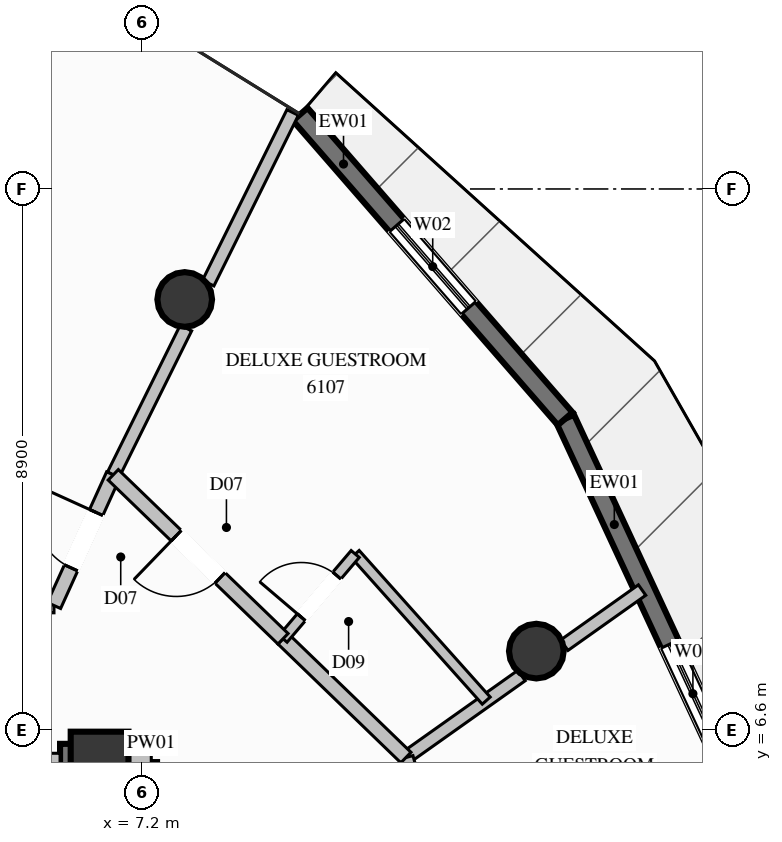
"""IFC4 building model, lengths in metres.
Left out: names, types, materials, properties, quantities, classifications, styles, units other than length and angle.
Written with IfcOpenShell. Run it as: python <this file> out.ifc"""

import sys

from ifc_helpers import new_model, si_unit, direction, frame, frame_2d, origin, origin_2d, place, context, subcontext, project, spatial, rectangle, circle, extrude, element, fill, save


model = new_model("IFC4")
c1 = context("Model", 3, precision=1e-05, world=origin(), true_north=direction((0.0, 1.0)))
c2 = subcontext(c1, "Body", "Model", "MODEL_VIEW")
j1 = project(units=[si_unit("LENGTHUNIT", "METRE"), si_unit("PLANEANGLEUNIT", "RADIAN")], contexts=[c1])
p1 = place(None, origin())
s1 = spatial("IfcSite", under=j1, at=p1, CompositionType="ELEMENT")
p2 = place(p1, origin())
s2 = spatial("IfcBuilding", under=s1, at=p2, CompositionType="ELEMENT")
p3 = place(p2, frame((0.0, 0.0, 227.2)))
s3 = spatial("IfcBuildingStorey", under=s2, at=p3, CompositionType="ELEMENT", Elevation=227.2)
p4 = place(p3, frame((6.5, 6.1, 0.0), z_axis=(0.0, 0.0, 1.0), x_axis=(1.0, 0.0, 0.0)))
e1 = element("IfcColumn", 1, at=p4, inside=s3, PredefinedType="COLUMN", context=c2, shape_type="SweptSolid", body=[
    extrude(rectangle(XDim=0.95, YDim=0.95, at=origin_2d()), origin(), (0.0, 0.0, 1.0), 3.6),
])
p5 = place(p3, frame((5.85, 6.1, 0.0), z_axis=(0.0, 0.0, 1.0), x_axis=(1.0, 0.0, 0.0)))
e2 = element("IfcWall", 2, at=p5, inside=s3, PredefinedType="SHEAR", context=c2, shape_type="SweptSolid", body=[
    extrude(rectangle(XDim=0.375, YDim=0.55, at=frame_2d((0.188, 0.0))), origin(), (0.0, 0.0, 1.0), 3.6),
])
p6 = place(p3, frame((6.5, 3.35, 0.0), z_axis=(0.0, 0.0, 1.0), x_axis=(0.0, 1.0, 0.0)))
e3 = element("IfcWall", 3, at=p6, inside=s3, PredefinedType="SHEAR", context=c2, shape_type="SweptSolid", body=[
    extrude(rectangle(XDim=3.025, YDim=0.55, at=frame_2d((1.512, 0.0))), origin(), (0.0, 0.0, 1.0), 3.6),
])
for number, where, z_axis, x_axis in (
    (4, (13.683, 7.9, 0.0), (0.0, 0.0, 1.0), (1.0, 0.0, 0.0)),
    (5, (7.9, 13.683, 0.0), (0.0, 0.0, 1.0), (1.0, 0.0, 0.0)),
):
    element("IfcColumn", number, at=place(p3, frame(where, z_axis=z_axis, x_axis=x_axis)), inside=s3, PredefinedType="COLUMN", context=c2, shape_type="SweptSolid", body=[
        extrude(circle(Radius=0.45, at=origin_2d()), origin(), (0.0, 0.0, 1.0), 3.6),
    ])
p7 = place(p3, frame((14.157, 11.721, 0.0), z_axis=(0.0, 0.0, 1.0), x_axis=(0.421409426627, -0.906870495247, 0.0)))
e6 = element("IfcWall", 6, at=p7, inside=s3, PredefinedType="SOLIDWALL", context=c2, shape_type="SweptSolid", body=[
    extrude(rectangle(XDim=6.785, YDim=0.32, at=frame_2d((3.392, 0.0))), origin(), (0.0, 0.0, 1.0), 3.36),
])
p8 = place(p7, frame((4.086, 0.0, 0.35)))
e7 = element("IfcOpeningElement", 7, at=p8, cuts=e6, PredefinedType="OPENING", context=c2, shape_type="SweptSolid", body=[
    extrude(rectangle(XDim=1.8, YDim=2.6, at=frame_2d((0.9, 1.3))), frame((0.0, 0.17, 0.0), z_axis=(0.0, -1.0, 0.0), x_axis=(1.0, 0.0, 0.0)), (0.0, 0.0, 1.0), 0.34),
])
p9 = place(p3, frame((9.8, 16.728, 0.0), z_axis=(0.0, 0.0, 1.0), x_axis=(0.656431844165, -0.754385335201, 0.0)))
e8 = element("IfcWall", 8, at=p9, inside=s3, PredefinedType="SOLIDWALL", context=c2, shape_type="SweptSolid", body=[
    extrude(rectangle(XDim=6.637, YDim=0.32, at=frame_2d((3.319, 0.0))), origin(), (0.0, 0.0, 1.0), 3.36),
])
p10 = place(p9, frame((2.419, 0.0, 0.35)))
e9 = element("IfcOpeningElement", 9, at=p10, cuts=e8, PredefinedType="OPENING", context=c2, shape_type="SweptSolid", body=[
    extrude(rectangle(XDim=1.8, YDim=2.6, at=frame_2d((0.9, 1.3))), frame((0.0, 0.17, 0.0), z_axis=(0.0, -1.0, 0.0), x_axis=(1.0, 0.0, 0.0)), (0.0, 0.0, 1.0), 0.34),
])
p11 = place(p3, frame((-7.35, 8.65, 0.0), z_axis=(0.0, 0.0, 1.0), x_axis=(1.0, 0.0, 0.0)))
e10 = element("IfcWall", 10, at=p11, inside=s3, PredefinedType="PARTITIONING", context=c2, shape_type="SweptSolid", body=[
    extrude(rectangle(XDim=13.1, YDim=0.24, at=frame_2d((6.55, 0.0))), origin(), (0.0, 0.0, 1.0), 3.36),
])
p12 = place(p3, frame((3.0, 6.1, 0.0), z_axis=(0.0, 0.0, 1.0), x_axis=(1.0, 0.0, 0.0)))
e11 = element("IfcWall", 11, at=p12, inside=s3, PredefinedType="PARTITIONING", context=c2, shape_type="SweptSolid", body=[
    extrude(rectangle(XDim=2.85, YDim=0.24, at=frame_2d((1.425, 0.0))), origin(), (0.0, 0.0, 1.0), 2.445),
])
p13 = place(p3, frame((7.35, 5.3, 0.0), z_axis=(0.0, 0.0, 1.0), x_axis=(0.0, 1.0, 0.0)))
e12 = element("IfcWall", 12, at=p13, inside=s3, PredefinedType="PARTITIONING", context=c2, shape_type="SweptSolid", body=[
    extrude(rectangle(XDim=0.8, YDim=0.24, at=frame_2d((0.4, 0.0))), origin(), (0.0, 0.0, 1.0), 2.445),
])
p14 = place(p3, frame((6.5, 6.1, 0.0), z_axis=(0.0, 0.0, 1.0), x_axis=(1.0, 0.0, 0.0)))
e13 = element("IfcWall", 13, at=p14, inside=s3, PredefinedType="PARTITIONING", context=c2, shape_type="SweptSolid", body=[
    extrude(rectangle(XDim=0.85, YDim=0.24, at=frame_2d((0.425, 0.0))), origin(), (0.0, 0.0, 1.0), 2.876),
])
p15 = place(p3, frame((11.538, 6.15, 0.0), z_axis=(0.0, 0.0, 1.0), x_axis=(0.815682557634, 0.578499753822, 0.0)))
e14 = element("IfcWall", 14, at=p15, inside=s3, PredefinedType="PARTITIONING", context=c2, shape_type="SweptSolid", body=[
    extrude(rectangle(XDim=2.33, YDim=0.21, at=frame_2d((1.165, 0.0))), origin(), (0.0, 0.0, 1.0), 2.876),
])
p16 = place(p3, frame((14.143, 7.997, 0.0), z_axis=(0.0, 0.0, 1.0), x_axis=(0.815727547958, 0.5784363124, 0.0)))
e15 = element("IfcWall", 15, at=p16, inside=s3, PredefinedType="PARTITIONING", context=c2, shape_type="SweptSolid", body=[
    extrude(rectangle(XDim=1.568, YDim=0.21, at=frame_2d((0.784, 0.0))), origin(), (0.0, 0.0, 1.0), 3.36),
])
p17 = place(p3, frame((6.725, 10.799, 0.0), z_axis=(0.0, 0.0, 1.0), x_axis=(0.443620421332, 0.896214774358, 0.0)))
e16 = element("IfcWall", 16, at=p17, inside=s3, PredefinedType="PARTITIONING", context=c2, shape_type="SweptSolid", body=[
    extrude(rectangle(XDim=2.693, YDim=0.21, at=frame_2d((1.347, 0.0))), origin(), (0.0, 0.0, 1.0), 2.876),
])
p18 = place(p3, frame((8.286, 13.952, 0.0), z_axis=(0.0, 0.0, 1.0), x_axis=(0.443654587732, 0.896197861404, 0.0)))
e17 = element("IfcWall", 17, at=p18, inside=s3, PredefinedType="PARTITIONING", context=c2, shape_type="SweptSolid", body=[
    extrude(rectangle(XDim=3.131, YDim=0.21, at=frame_2d((1.565, 0.0))), origin(), (0.0, 0.0, 1.0), 3.36),
])
p19 = place(p3, frame((5.75, 8.65, 0.0), z_axis=(0.0, 0.0, 1.0), x_axis=(0.413171528251, 0.910653220629, 0.0)))
e18 = element("IfcWall", 18, at=p19, inside=s3, PredefinedType="PARTITIONING", context=c2, shape_type="SweptSolid", body=[
    extrude(rectangle(XDim=2.36, YDim=0.24, at=frame_2d((1.18, 0.0))), origin(), (0.0, 0.0, 1.0), 2.876),
])
p20 = place(p19, frame((0.68, 0.0, 0.0)))
e19 = element("IfcOpeningElement", 19, at=p20, cuts=e18, PredefinedType="OPENING", context=c2, shape_type="SweptSolid", body=[
    extrude(rectangle(XDim=1.0, YDim=2.2, at=frame_2d((0.5, 1.1))), frame((0.0, 0.13, 0.0), z_axis=(0.0, -1.0, 0.0), x_axis=(1.0, 0.0, 0.0)), (0.0, 0.0, 1.0), 0.26),
])
p21 = place(p3, frame((12.56, 2.467, 0.0), z_axis=(0.0, 0.0, 1.0), x_axis=(-0.267390175797, 0.963588342544, 0.0)))
e20 = element("IfcWall", 20, at=p21, inside=s3, PredefinedType="PARTITIONING", context=c2, shape_type="SweptSolid", body=[
    extrude(rectangle(XDim=3.822, YDim=0.24, at=frame_2d((1.911, 0.0))), origin(), (0.0, 0.0, 1.0), 3.36),
])
p22 = place(p21, frame((1.411, 0.0, 0.0)))
e21 = element("IfcOpeningElement", 21, at=p22, cuts=e20, PredefinedType="OPENING", context=c2, shape_type="SweptSolid", body=[
    extrude(rectangle(XDim=1.0, YDim=2.2, at=frame_2d((0.5, 1.1))), frame((0.0, 0.13, 0.0), z_axis=(0.0, -1.0, 0.0), x_axis=(1.0, 0.0, 0.0)), (0.0, 0.0, 1.0), 0.26),
])
p23 = place(p3, frame((11.538, 6.15, 0.0), z_axis=(0.0, 0.0, 1.0), x_axis=(-0.719078080202, 0.694929287463, 0.0)))
e22 = element("IfcWall", 22, at=p23, inside=s3, PredefinedType="PARTITIONING", context=c2, shape_type="SweptSolid", body=[
    extrude(rectangle(XDim=2.811, YDim=0.24, at=frame_2d((1.405, 0.0))), origin(), (0.0, 0.0, 1.0), 3.36),
])
p24 = place(p3, frame((12.859, 7.086, 0.0), z_axis=(0.0, 0.0, 1.0), x_axis=(-0.666357777504, 0.745632156201, 0.0)))
e23 = element("IfcWall", 23, at=p24, inside=s3, PredefinedType="PLUMBINGWALL", context=c2, shape_type="SweptSolid", body=[
    extrude(rectangle(XDim=3.234, YDim=0.175, at=frame_2d((1.617, 0.0))), origin(), (0.0, 0.0, 1.0), 3.36),
])
p25 = place(p3, frame((9.517, 8.103, 0.0), z_axis=(0.0, 0.0, 1.0), x_axis=(0.64830617709, 0.76137973492, 0.0)))
e24 = element("IfcWall", 24, at=p25, inside=s3, PredefinedType="PLUMBINGWALL", context=c2, shape_type="SweptSolid", body=[
    extrude(rectangle(XDim=1.831, YDim=0.175, at=frame_2d((0.916, 0.0))), origin(), (0.0, 0.0, 1.0), 3.36),
])
p26 = place(p25, frame((0.465, 0.0, 0.0)))
e25 = element("IfcOpeningElement", 25, at=p26, cuts=e24, PredefinedType="OPENING", context=c2, shape_type="SweptSolid", body=[
    extrude(rectangle(XDim=0.9, YDim=2.1, at=frame_2d((0.45, 1.05))), frame((0.0, 0.098, 0.0), z_axis=(0.0, -1.0, 0.0), x_axis=(1.0, 0.0, 0.0)), (0.0, 0.0, 1.0), 0.195),
])
p27 = place(p3, frame((9.517, 8.103, 0.0), z_axis=(0.0, 0.0, 1.0), x_axis=(-0.719359188441, 0.694638292931, 0.0)))
e26 = element("IfcWall", 26, at=p27, inside=s3, PredefinedType="PARTITIONING", context=c2, shape_type="SweptSolid", body=[
    extrude(rectangle(XDim=3.881, YDim=0.24, at=frame_2d((1.94, 0.0))), origin(), (0.0, 0.0, 1.0), 3.36),
])
p28 = place(p27, frame((1.441, 0.0, 0.0)))
e27 = element("IfcOpeningElement", 27, at=p28, cuts=e26, PredefinedType="OPENING", context=c2, shape_type="SweptSolid", body=[
    extrude(rectangle(XDim=1.0, YDim=2.2, at=frame_2d((0.5, 1.1))), frame((0.0, 0.13, 0.0), z_axis=(0.0, -1.0, 0.0), x_axis=(1.0, 0.0, 0.0)), (0.0, 0.0, 1.0), 0.26),
])
p29 = place(p8, origin())
e28 = element("IfcWindow", 28, at=p29, inside=s3, PartitioningType="SINGLE_PANEL", PredefinedType="WINDOW", context=c2, shape_type="SweptSolid", body=[
    extrude(rectangle(XDim=1.8, YDim=2.6, at=frame_2d((0.9, 1.3))), frame((0.0, 0.03, 0.0), z_axis=(0.0, -1.0, 0.0), x_axis=(1.0, 0.0, 0.0)), (0.0, 0.0, 1.0), 0.06),
])
fill(e7, e28)
p30 = place(p10, origin())
e29 = element("IfcWindow", 29, at=p30, inside=s3, PartitioningType="SINGLE_PANEL", PredefinedType="WINDOW", context=c2, shape_type="SweptSolid", body=[
    extrude(rectangle(XDim=1.8, YDim=2.6, at=frame_2d((0.9, 1.3))), frame((0.0, 0.03, 0.0), z_axis=(0.0, -1.0, 0.0), x_axis=(1.0, 0.0, 0.0)), (0.0, 0.0, 1.0), 0.06),
])
fill(e9, e29)
p31 = place(p20, origin())
e30 = element("IfcDoor", 30, at=p31, inside=s3, OperationType="SINGLE_SWING_RIGHT", PredefinedType="DOOR", context=c2, shape_type="SweptSolid", body=[
    extrude(rectangle(XDim=1.0, YDim=2.2, at=frame_2d((0.5, 1.1))), frame((0.0, 0.025, 0.0), z_axis=(0.0, -1.0, 0.0), x_axis=(1.0, 0.0, 0.0)), (0.0, 0.0, 1.0), 0.05),
])
fill(e19, e30)
p32 = place(p26, origin())
e31 = element("IfcDoor", 31, at=p32, inside=s3, OperationType="SINGLE_SWING_LEFT", PredefinedType="DOOR", context=c2, shape_type="SweptSolid", body=[
    extrude(rectangle(XDim=0.9, YDim=2.1, at=frame_2d((0.45, 1.05))), frame((0.0, 0.025, 0.0), z_axis=(0.0, -1.0, 0.0), x_axis=(1.0, 0.0, 0.0)), (0.0, 0.0, 1.0), 0.05),
])
fill(e25, e31)
p33 = place(p28, origin())
e32 = element("IfcDoor", 32, at=p33, inside=s3, OperationType="SINGLE_SWING_RIGHT", PredefinedType="DOOR", context=c2, shape_type="SweptSolid", body=[
    extrude(rectangle(XDim=1.0, YDim=2.2, at=frame_2d((0.5, 1.1))), frame((0.0, 0.025, 0.0), z_axis=(0.0, -1.0, 0.0), x_axis=(1.0, 0.0, 0.0)), (0.0, 0.0, 1.0), 0.05),
])
fill(e27, e32)
save(model, sys.argv[1])
